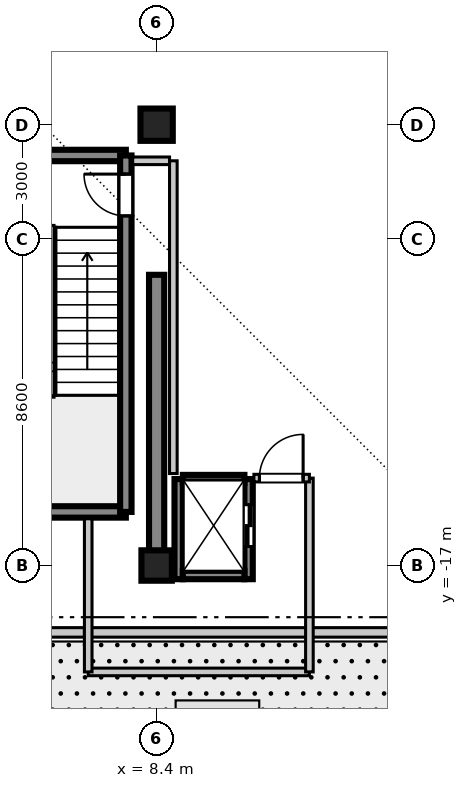
"""IFC4 building model, lengths in metres.
Left out: names, types, materials, properties, quantities, classifications, styles, units other than length and angle.
Written with IfcOpenShell. Run it as: python <this file> out.ifc"""

import sys

from ifc_helpers import new_model, si_unit, direction, frame, frame_2d, origin, origin_2d, place, context, subcontext, project, spatial, rectangle, extrude, source, transform, mapped, element, fill, save


model = new_model("IFC4")
c1 = context("Model", 3, precision=1e-05, world=origin(), true_north=direction((0.0, 1.0)))
c2 = subcontext(c1, "Body", "Model", "MODEL_VIEW")
j1 = project(units=[si_unit("LENGTHUNIT", "METRE"), si_unit("PLANEANGLEUNIT", "RADIAN")], contexts=[c1])
p1 = place(None, origin())
s1 = spatial("IfcSite", under=j1, at=p1, CompositionType="ELEMENT")
p2 = place(p1, origin())
s2 = spatial("IfcBuilding", under=s1, at=p2, CompositionType="ELEMENT")
p3 = place(p2, frame((0.0, 0.0, 357.05)))
s3 = spatial("IfcBuildingStorey", under=s2, at=p3, CompositionType="ELEMENT", Elevation=357.05)
m1 = source(origin(), c2, "Body", "SweptSolid", [
    extrude(rectangle(XDim=0.8, YDim=0.8, at=origin_2d()), origin(), (0.0, 0.0, 1.0), 4.555),
])
p4 = place(p3, frame((8.4, -17.0, 0.0), z_axis=(0.0, 0.0, 1.0), x_axis=(1.0, 0.0, 0.0)))
e1 = element("IfcColumn", 1, at=p4, inside=s3, PredefinedType="COLUMN", context=c2, shape_type="MappedRepresentation", body=[
    mapped(m1, transform((0.0, 0.0, 0.0), scale=1.0)),
])
m2 = source(origin(), c2, "Body", "SweptSolid", [
    extrude(rectangle(XDim=0.85, YDim=0.85, at=origin_2d()), origin(), (0.0, 0.0, 1.0), 4.555),
])
p5 = place(p3, frame((8.4, -5.4, 0.0), z_axis=(0.0, 0.0, 1.0), x_axis=(1.0, 0.0, 0.0)))
e2 = element("IfcColumn", 2, at=p5, inside=s3, PredefinedType="PILASTER", context=c2, shape_type="MappedRepresentation", body=[
    mapped(m2, transform((0.0, 0.0, 0.0), scale=1.0)),
])
m3 = source(origin(), c2, "Body", "SweptSolid", [
    extrude(rectangle(XDim=7.65, YDim=0.4, at=frame_2d((3.825, 0.0))), origin(), (0.0, 0.0, 1.0), 4.3),
])
p6 = place(p3, frame((8.4, -17.0, 0.0), z_axis=(0.0, 0.0, 1.0), x_axis=(0.0, 1.0, 0.0)))
e3 = element("IfcWall", 3, at=p6, inside=s3, PredefinedType="SHEAR", context=c2, shape_type="MappedRepresentation", body=[
    mapped(m3, transform((0.0, 0.0, 0.0), scale=1.0)),
])
m4 = source(origin(), c2, "Body", "SweptSolid", [
    extrude(rectangle(XDim=3.98, YDim=0.3, at=frame_2d((1.99, 0.0))), origin(), (0.0, 0.0, 1.0), 4.3),
])
for number, where, z_axis, x_axis in (
    (4, (3.61, -15.59, 0.0), (0.0, 0.0, 1.0), (1.0, 0.0, 0.0)),
    (5, (3.61, -6.21, 0.0), (0.0, 0.0, 1.0), (1.0, 0.0, 0.0)),
):
    element("IfcWall", number, at=place(p3, frame(where, z_axis=z_axis, x_axis=x_axis)), inside=s3, PredefinedType="SHEAR", context=c2, shape_type="MappedRepresentation", body=[
        mapped(m4, transform((0.0, 0.0, 0.0), scale=1.0)),
    ])
m5 = source(origin(), c2, "Body", "SweptSolid", [
    extrude(rectangle(XDim=9.38, YDim=0.3, at=frame_2d((4.69, 0.0))), origin(), (0.0, 0.0, 1.0), 4.3),
])
p7 = place(p3, frame((7.59, -15.59, 0.0), z_axis=(0.0, 0.0, 1.0), x_axis=(0.0, 1.0, 0.0)))
e6 = element("IfcWall", 6, at=p7, inside=s3, PredefinedType="SHEAR", context=c2, shape_type="MappedRepresentation", body=[
    mapped(m5, transform((0.0, 0.0, 0.0), scale=1.0)),
])
p8 = place(p7, frame((7.79, 0.0, 0.0)))
e7 = element("IfcOpeningElement", 7, at=p8, cuts=e6, PredefinedType="OPENING", context=c2, shape_type="SweptSolid", body=[
    extrude(rectangle(XDim=1.1, YDim=2.15, at=frame_2d((0.55, 1.075))), frame((0.0, 0.16, 0.0), z_axis=(0.0, -1.0, 0.0), x_axis=(1.0, 0.0, 0.0)), (0.0, 0.0, 1.0), 0.32),
])
m6 = source(origin(), c2, "Body", "SweptSolid", [
    extrude(rectangle(XDim=2.635, YDim=0.22, at=frame_2d((1.317, 0.0))), origin(), (0.0, 0.0, 1.0), 4.3),
])
p9 = place(p3, frame((8.98, -17.36, 0.0), z_axis=(0.0, 0.0, 1.0), x_axis=(0.0, 1.0, 0.0)))
e8 = element("IfcWall", 8, at=p9, inside=s3, PredefinedType="SHEAR", context=c2, shape_type="MappedRepresentation", body=[
    mapped(m6, transform((0.0, 0.0, 0.0), scale=1.0)),
])
p10 = place(p3, frame((10.82, -17.36, 0.0), z_axis=(0.0, 0.0, 1.0), x_axis=(0.0, 1.0, 0.0)))
e9 = element("IfcWall", 9, at=p10, inside=s3, PredefinedType="SHEAR", context=c2, shape_type="MappedRepresentation", body=[
    mapped(m6, transform((0.0, 0.0, 0.0), scale=1.0)),
])
p11 = place(p10, frame((0.86, 0.0, 0.0)))
e10 = element("IfcOpeningElement", 10, at=p11, cuts=e9, PredefinedType="OPENING", context=c2, shape_type="SweptSolid", body=[
    extrude(rectangle(XDim=1.1, YDim=2.2, at=frame_2d((0.55, 1.1))), frame((0.0, 0.12, 0.0), z_axis=(0.0, -1.0, 0.0), x_axis=(1.0, 0.0, 0.0)), (0.0, 0.0, 1.0), 0.24),
])
m7 = source(origin(), c2, "Body", "SweptSolid", [
    extrude(rectangle(XDim=1.62, YDim=0.22, at=frame_2d((0.81, 0.0))), origin(), (0.0, 0.0, 1.0), 4.3),
])
p12 = place(p3, frame((9.09, -17.25, 0.0), z_axis=(0.0, 0.0, 1.0), x_axis=(1.0, 0.0, 0.0)))
e11 = element("IfcWall", 11, at=p12, inside=s3, PredefinedType="SHEAR", context=c2, shape_type="MappedRepresentation", body=[
    mapped(m7, transform((0.0, 0.0, 0.0), scale=1.0)),
])
m8 = source(origin(), c2, "Body", "SweptSolid", [
    extrude(rectangle(XDim=1.62, YDim=0.22, at=frame_2d((0.81, 0.0))), origin(), (0.0, 0.0, 1.0), 4.6),
])
p13 = place(p3, frame((9.09, -14.725, 0.0), z_axis=(0.0, 0.0, 1.0), x_axis=(1.0, 0.0, 0.0)))
e12 = element("IfcWall", 12, at=p13, inside=s3, PredefinedType="SHEAR", context=c2, shape_type="MappedRepresentation", body=[
    mapped(m8, transform((0.0, 0.0, 0.0), scale=1.0)),
])
m9 = source(origin(), c2, "Body", "SweptSolid", [
    extrude(rectangle(XDim=9.46, YDim=0.25, at=frame_2d((4.73, 0.0))), origin(), (0.0, 0.0, 1.0), 3.78),
])
p14 = place(p3, frame((6.5, -18.76, 0.0), z_axis=(0.0, 0.0, 1.0), x_axis=(1.0, 0.0, 0.0)))
e13 = element("IfcWall", 13, at=p14, inside=s3, PredefinedType="STANDARD", context=c2, shape_type="MappedRepresentation", body=[
    mapped(m9, transform((0.0, 0.0, 0.0), scale=1.0)),
])
m10 = source(origin(), c2, "Body", "SweptSolid", [
    extrude(rectangle(XDim=13.0, YDim=0.25, at=frame_2d((6.5, 0.0))), origin(), (0.0, 0.0, 1.0), 3.78),
])
p15 = place(p3, frame((-6.5, -18.76, 0.0), z_axis=(0.0, 0.0, 1.0), x_axis=(1.0, 0.0, 0.0)))
e14 = element("IfcWall", 14, at=p15, inside=s3, PredefinedType="STANDARD", context=c2, shape_type="MappedRepresentation", body=[
    mapped(m10, transform((0.0, 0.0, 0.0), scale=1.0)),
])
p16 = place(p15, frame((5.5, 0.0, 0.0)))
e15 = element("IfcOpeningElement", 15, at=p16, cuts=e14, PredefinedType="OPENING", context=c2, shape_type="SweptSolid", body=[
    extrude(rectangle(XDim=2.0, YDim=2.35, at=frame_2d((1.0, 1.175))), frame((0.0, 0.135, 0.0), z_axis=(0.0, -1.0, 0.0), x_axis=(1.0, 0.0, 0.0)), (0.0, 0.0, 1.0), 0.27),
])
p17 = place(p15, frame((9.3, 0.0, 0.9)))
e16 = element("IfcOpeningElement", 16, at=p17, cuts=e14, PredefinedType="OPENING", context=c2, shape_type="SweptSolid", body=[
    extrude(rectangle(XDim=1.6, YDim=1.8, at=frame_2d((0.8, 0.9))), frame((0.0, 0.135, 0.0), z_axis=(0.0, -1.0, 0.0), x_axis=(1.0, 0.0, 0.0)), (0.0, 0.0, 1.0), 0.27),
])
m11 = source(origin(), c2, "Body", "SweptSolid", [
    extrude(rectangle(XDim=5.82, YDim=0.2, at=frame_2d((2.91, 0.0))), origin(), (0.0, 0.0, 1.0), 3.4),
])
p18 = place(p3, frame((6.6, -19.8, 0.0), z_axis=(0.0, 0.0, 1.0), x_axis=(1.0, 0.0, 0.0)))
e17 = element("IfcWall", 17, at=p18, inside=s3, PredefinedType="PARTITIONING", context=c2, shape_type="MappedRepresentation", body=[
    mapped(m11, transform((0.0, 0.0, 0.0), scale=1.0)),
])
m12 = source(origin(), c2, "Body", "SweptSolid", [
    extrude(rectangle(XDim=4.03, YDim=0.2, at=frame_2d((2.015, 0.0))), origin(), (0.0, 0.0, 1.0), 3.4),
])
p19 = place(p3, frame((6.6, -19.8, 0.0), z_axis=(0.0, 0.0, 1.0), x_axis=(0.0, 1.0, 0.0)))
e18 = element("IfcWall", 18, at=p19, inside=s3, PredefinedType="PARTITIONING", context=c2, shape_type="MappedRepresentation", body=[
    mapped(m12, transform((0.0, 0.0, 0.0), scale=1.0)),
])
m13 = source(origin(), c2, "Body", "SweptSolid", [
    extrude(rectangle(XDim=5.1, YDim=0.2, at=frame_2d((2.55, 0.0))), origin(), (0.0, 0.0, 1.0), 3.4),
])
p20 = place(p3, frame((12.42, -19.8, 0.0), z_axis=(0.0, 0.0, 1.0), x_axis=(0.0, 1.0, 0.0)))
e19 = element("IfcWall", 19, at=p20, inside=s3, PredefinedType="PARTITIONING", context=c2, shape_type="MappedRepresentation", body=[
    mapped(m13, transform((0.0, 0.0, 0.0), scale=1.0)),
])
m14 = source(origin(), c2, "Body", "SweptSolid", [
    extrude(rectangle(XDim=1.46, YDim=0.2, at=frame_2d((0.73, 0.0))), origin(), (0.0, 0.0, 1.0), 3.4),
])
p21 = place(p3, frame((10.96, -14.7, 0.0), z_axis=(0.0, 0.0, 1.0), x_axis=(1.0, 0.0, 0.0)))
e20 = element("IfcWall", 20, at=p21, inside=s3, PredefinedType="PARTITIONING", context=c2, shape_type="MappedRepresentation", body=[
    mapped(m14, transform((0.0, 0.0, 0.0), scale=1.0)),
])
p22 = place(p21, frame((0.145, 0.0, 0.0)))
e21 = element("IfcOpeningElement", 21, at=p22, cuts=e20, PredefinedType="OPENING", context=c2, shape_type="SweptSolid", body=[
    extrude(rectangle(XDim=1.15, YDim=2.15, at=frame_2d((0.575, 1.075))), frame((0.0, 0.11, 0.0), z_axis=(0.0, -1.0, 0.0), x_axis=(1.0, 0.0, 0.0)), (0.0, 0.0, 1.0), 0.22),
])
m15 = source(origin(), c2, "Body", "SweptSolid", [
    extrude(rectangle(XDim=0.97, YDim=0.2, at=frame_2d((0.485, 0.0))), origin(), (0.0, 0.0, 1.0), 3.4),
])
p23 = place(p3, frame((7.77, -6.35, 0.0), z_axis=(0.0, 0.0, 1.0), x_axis=(1.0, 0.0, 0.0)))
e22 = element("IfcWall", 22, at=p23, inside=s3, PredefinedType="PARTITIONING", context=c2, shape_type="MappedRepresentation", body=[
    mapped(m15, transform((0.0, 0.0, 0.0), scale=1.0)),
])
m16 = source(origin(), c2, "Body", "SweptSolid", [
    extrude(rectangle(XDim=8.23, YDim=0.2, at=frame_2d((4.115, 0.0))), origin(), (0.0, 0.0, 1.0), 3.4),
])
p24 = place(p3, frame((8.84, -14.58, 0.0), z_axis=(0.0, 0.0, 1.0), x_axis=(0.0, 1.0, 0.0)))
e23 = element("IfcWall", 23, at=p24, inside=s3, PredefinedType="PARTITIONING", context=c2, shape_type="MappedRepresentation", body=[
    mapped(m16, transform((0.0, 0.0, 0.0), scale=1.0)),
])
m17 = source(origin(), c2, "Body", "SweptSolid", [
    extrude(rectangle(XDim=1.1, YDim=2.15, at=frame_2d((0.55, 1.075))), frame((0.0, 0.025, 0.0), z_axis=(0.0, -1.0, 0.0), x_axis=(1.0, 0.0, 0.0)), (0.0, 0.0, 1.0), 0.05),
])
p25 = place(p8, origin())
e24 = element("IfcDoor", 24, at=p25, inside=s3, OperationType="SINGLE_SWING_RIGHT", PredefinedType="DOOR", context=c2, shape_type="MappedRepresentation", body=[
    mapped(m17, transform((0.0, 0.0, 0.0), scale=1.0)),
])
fill(e7, e24)
m18 = source(origin(), c2, "Body", "SweptSolid", [
    extrude(rectangle(XDim=1.1, YDim=2.2, at=frame_2d((0.55, 1.1))), frame((0.0, 0.025, 0.0), z_axis=(0.0, -1.0, 0.0), x_axis=(1.0, 0.0, 0.0)), (0.0, 0.0, 1.0), 0.05),
])
p26 = place(p11, frame((1.1, 0.0, 0.0), z_axis=(0.0, 0.0, 1.0), x_axis=(-1.0, 0.0, 0.0)))
e25 = element("IfcDoor", 25, at=p26, inside=s3, OperationType="DOUBLE_DOOR_SLIDING", PredefinedType="DOOR", context=c2, shape_type="MappedRepresentation", body=[
    mapped(m18, transform((0.0, 0.0, 0.0), scale=1.0)),
])
fill(e10, e25)
m19 = source(origin(), c2, "Body", "SweptSolid", [
    extrude(rectangle(XDim=1.15, YDim=2.15, at=frame_2d((0.575, 1.075))), frame((0.0, 0.025, 0.0), z_axis=(0.0, -1.0, 0.0), x_axis=(1.0, 0.0, 0.0)), (0.0, 0.0, 1.0), 0.05),
])
p27 = place(p22, origin())
e26 = element("IfcDoor", 26, at=p27, inside=s3, OperationType="SINGLE_SWING_RIGHT", PredefinedType="DOOR", context=c2, shape_type="MappedRepresentation", body=[
    mapped(m19, transform((0.0, 0.0, 0.0), scale=1.0)),
])
fill(e21, e26)
save(model, sys.argv[1])
